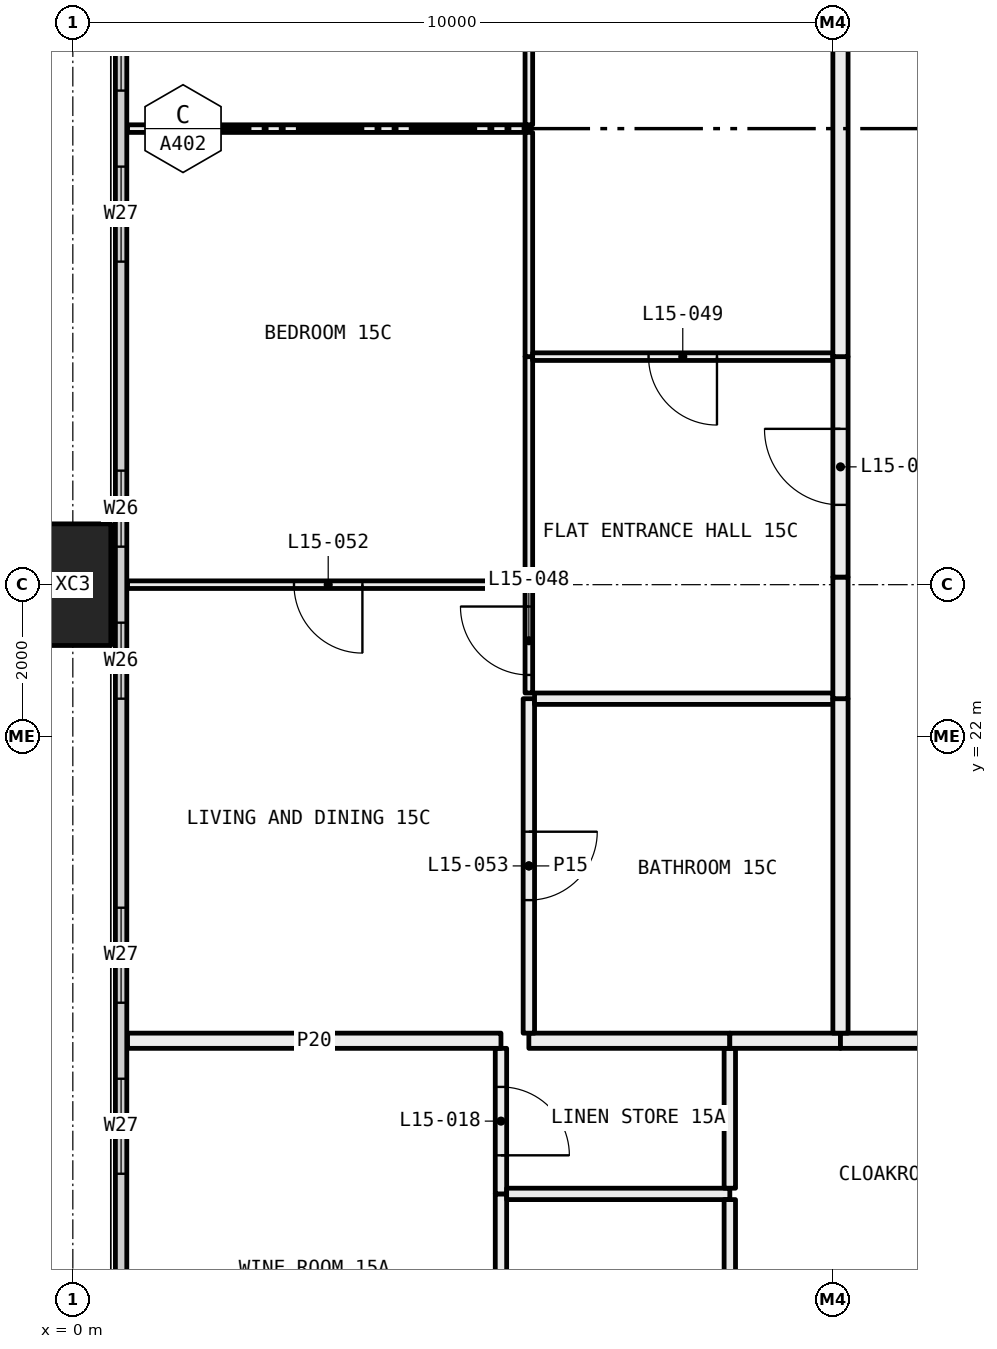
"""IFC4 building model, lengths in metres.
Left out: names, types, materials, properties, quantities, classifications, styles, units other than length and angle.
Written with IfcOpenShell. Run it as: python <this file> out.ifc"""

import sys

from ifc_helpers import new_model, si_unit, direction, frame, frame_2d, origin, origin_2d, place, context, subcontext, project, spatial, rectangle, hollow_rectangle, extrude, element, fill, save


model = new_model("IFC4")
c1 = context("Model", 3, precision=1e-05, world=origin(), true_north=direction((0.0, 1.0)))
c2 = subcontext(c1, "Body", "Model", "MODEL_VIEW")
j1 = project(units=[si_unit("LENGTHUNIT", "METRE"), si_unit("PLANEANGLEUNIT", "RADIAN")], contexts=[c1])
p1 = place(None, origin())
s1 = spatial("IfcSite", under=j1, at=p1, CompositionType="ELEMENT")
p2 = place(p1, origin())
s2 = spatial("IfcBuilding", under=s1, at=p2, CompositionType="ELEMENT")
p3 = place(p2, frame((0.0, 0.0, 64.5)))
s3 = spatial("IfcBuildingStorey", under=s2, at=p3, CompositionType="ELEMENT", Elevation=64.5)
p4 = place(p3, frame((0.0, 24.0, -0.4), z_axis=(0.0, 0.0, 1.0), x_axis=(0.0, 1.0, 0.0)))
e1 = element("IfcColumn", 1, at=p4, inside=s3, PredefinedType="COLUMN", context=c2, shape_type="SweptSolid", body=[
    extrude(hollow_rectangle(XDim=1.6, YDim=1.0, WallThickness=0.065, at=origin_2d()), origin(), (0.0, 0.0, 1.0), 3.45),
])
p5 = place(p3, frame((0.635, 6.71, 0.0), z_axis=(0.0, 0.0, 1.0), x_axis=(0.0, 1.0, 0.0)))
e2 = element("IfcWall", 2, at=p5, inside=s3, PredefinedType="ELEMENTEDWALL", context=c2, shape_type="SweptSolid", body=[
    extrude(rectangle(XDim=34.58, YDim=0.15, at=frame_2d((17.29, 0.0))), origin(), (0.0, 0.0, 1.0), 3.05),
])
p6 = place(p5, frame((0.29, 0.0, 0.45)))
e3 = element("IfcOpeningElement", 3, at=p6, cuts=e2, PredefinedType="OPENING", context=c2, shape_type="SweptSolid", body=[
    extrude(rectangle(XDim=4.5, YDim=2.55, at=frame_2d((2.25, 1.275))), frame((0.0, 0.085, 0.0), z_axis=(0.0, -1.0, 0.0), x_axis=(1.0, 0.0, 0.0)), (0.0, 0.0, 1.0), 0.17),
])
p7 = place(p5, frame((5.79, 0.0, 0.45)))
e4 = element("IfcOpeningElement", 4, at=p7, cuts=e2, PredefinedType="OPENING", context=c2, shape_type="SweptSolid", body=[
    extrude(rectangle(XDim=1.0, YDim=2.55, at=frame_2d((0.5, 1.275))), frame((0.0, 0.085, 0.0), z_axis=(0.0, -1.0, 0.0), x_axis=(1.0, 0.0, 0.0)), (0.0, 0.0, 1.0), 0.17),
])
p8 = place(p5, frame((9.54, 0.0, 0.45)))
e5 = element("IfcOpeningElement", 5, at=p8, cuts=e2, PredefinedType="OPENING", context=c2, shape_type="SweptSolid", body=[
    extrude(rectangle(XDim=1.25, YDim=2.55, at=frame_2d((0.625, 1.275))), frame((0.0, 0.085, 0.0), z_axis=(0.0, -1.0, 0.0), x_axis=(1.0, 0.0, 0.0)), (0.0, 0.0, 1.0), 0.17),
])
p9 = place(p5, frame((11.79, 0.0, 0.45)))
e6 = element("IfcOpeningElement", 6, at=p9, cuts=e2, PredefinedType="OPENING", context=c2, shape_type="SweptSolid", body=[
    extrude(rectangle(XDim=1.25, YDim=2.55, at=frame_2d((0.625, 1.275))), frame((0.0, 0.085, 0.0), z_axis=(0.0, -1.0, 0.0), x_axis=(1.0, 0.0, 0.0)), (0.0, 0.0, 1.0), 0.17),
])
p10 = place(p5, frame((15.79, 0.0, 0.45)))
e7 = element("IfcOpeningElement", 7, at=p10, cuts=e2, PredefinedType="OPENING", context=c2, shape_type="SweptSolid", body=[
    extrude(rectangle(XDim=1.0, YDim=2.55, at=frame_2d((0.5, 1.275))), frame((0.0, 0.085, 0.0), z_axis=(0.0, -1.0, 0.0), x_axis=(1.0, 0.0, 0.0)), (0.0, 0.0, 1.0), 0.17),
])
p11 = place(p5, frame((17.79, 0.0, 0.45)))
e8 = element("IfcOpeningElement", 8, at=p11, cuts=e2, PredefinedType="OPENING", context=c2, shape_type="SweptSolid", body=[
    extrude(rectangle(XDim=1.0, YDim=2.55, at=frame_2d((0.5, 1.275))), frame((0.0, 0.085, 0.0), z_axis=(0.0, -1.0, 0.0), x_axis=(1.0, 0.0, 0.0)), (0.0, 0.0, 1.0), 0.17),
])
p12 = place(p5, frame((21.54, 0.0, 0.45)))
e9 = element("IfcOpeningElement", 9, at=p12, cuts=e2, PredefinedType="OPENING", context=c2, shape_type="SweptSolid", body=[
    extrude(rectangle(XDim=1.25, YDim=2.55, at=frame_2d((0.625, 1.275))), frame((0.0, 0.085, 0.0), z_axis=(0.0, -1.0, 0.0), x_axis=(1.0, 0.0, 0.0)), (0.0, 0.0, 1.0), 0.17),
])
p13 = place(p5, frame((23.79, 0.0, 0.45)))
e10 = element("IfcOpeningElement", 10, at=p13, cuts=e2, PredefinedType="OPENING", context=c2, shape_type="SweptSolid", body=[
    extrude(rectangle(XDim=1.25, YDim=2.55, at=frame_2d((0.625, 1.275))), frame((0.0, 0.085, 0.0), z_axis=(0.0, -1.0, 0.0), x_axis=(1.0, 0.0, 0.0)), (0.0, 0.0, 1.0), 0.17),
])
p14 = place(p5, frame((27.79, 0.0, 0.45)))
e11 = element("IfcOpeningElement", 11, at=p14, cuts=e2, PredefinedType="OPENING", context=c2, shape_type="SweptSolid", body=[
    extrude(rectangle(XDim=1.0, YDim=2.55, at=frame_2d((0.5, 1.275))), frame((0.0, 0.085, 0.0), z_axis=(0.0, -1.0, 0.0), x_axis=(1.0, 0.0, 0.0)), (0.0, 0.0, 1.0), 0.17),
])
p15 = place(p5, frame((29.79, 0.0, 0.45)))
e12 = element("IfcOpeningElement", 12, at=p15, cuts=e2, PredefinedType="OPENING", context=c2, shape_type="SweptSolid", body=[
    extrude(rectangle(XDim=4.5, YDim=2.55, at=frame_2d((2.25, 1.275))), frame((0.0, 0.085, 0.0), z_axis=(0.0, -1.0, 0.0), x_axis=(1.0, 0.0, 0.0)), (0.0, 0.0, 1.0), 0.17),
])
p16 = place(p3, frame((5.633, 12.075, 0.0), z_axis=(0.0, 0.0, 1.0), x_axis=(0.0, 1.0, 0.0)))
e13 = element("IfcWall", 13, at=p16, inside=s3, PredefinedType="PARTITIONING", context=c2, shape_type="SweptSolid", body=[
    extrude(rectangle(XDim=3.91, YDim=0.15, at=frame_2d((1.955, 0.0))), origin(), (0.0, 0.0, 1.0), 2.45),
])
p17 = place(p3, frame((5.633, 15.985, 0.0), z_axis=(0.0, 0.0, 1.0), x_axis=(0.0, 1.0, 0.0)))
e14 = element("IfcWall", 14, at=p17, inside=s3, PredefinedType="PARTITIONING", context=c2, shape_type="SweptSolid", body=[
    extrude(rectangle(XDim=1.915, YDim=0.15, at=frame_2d((0.958, 0.0))), origin(), (0.0, 0.0, 1.0), 3.05),
])
p18 = place(p17, frame((0.508, 0.0, 0.0)))
e15 = element("IfcOpeningElement", 15, at=p18, cuts=e14, PredefinedType="OPENING", context=c2, shape_type="SweptSolid", body=[
    extrude(rectangle(XDim=0.9, YDim=2.1, at=frame_2d((0.45, 1.05))), frame((0.0, 0.085, 0.0), z_axis=(0.0, -1.0, 0.0), x_axis=(1.0, 0.0, 0.0)), (0.0, 0.0, 1.0), 0.17),
])
p19 = place(p3, frame((5.633, 18.0, 0.0), z_axis=(0.0, 0.0, 1.0), x_axis=(-1.0, 0.0, 0.0)))
e16 = element("IfcWall", 16, at=p19, inside=s3, PredefinedType="PARTITIONING", context=c2, shape_type="SweptSolid", body=[
    extrude(rectangle(XDim=4.913, YDim=0.2, at=frame_2d((2.457, 0.0))), origin(), (0.0, 0.0, 1.0), 3.05),
])
p20 = place(p3, frame((8.644, 15.985, 0.0), z_axis=(0.0, 0.0, 1.0), x_axis=(-1.0, 0.0, 0.0)))
e17 = element("IfcWall", 17, at=p20, inside=s3, PredefinedType="PARTITIONING", context=c2, shape_type="SweptSolid", body=[
    extrude(rectangle(XDim=2.936, YDim=0.15, at=frame_2d((1.468, 0.0))), origin(), (0.0, 0.0, 1.0), 3.05),
])
p21 = place(p3, frame((8.644, 14.471, 0.0), z_axis=(0.0, 0.0, 1.0), x_axis=(0.0, 1.0, 0.0)))
e18 = element("IfcWall", 18, at=p21, inside=s3, PredefinedType="PARTITIONING", context=c2, shape_type="SweptSolid", body=[
    extrude(rectangle(XDim=1.439, YDim=0.15, at=frame_2d((0.719, 0.0))), origin(), (0.0, 0.0, 1.0), 3.05),
])
p22 = place(p3, frame((8.644, 16.06, 0.0), z_axis=(0.0, 0.0, 1.0), x_axis=(0.0, 1.0, 0.0)))
e19 = element("IfcWall", 19, at=p22, inside=s3, PredefinedType="PARTITIONING", context=c2, shape_type="SweptSolid", body=[
    extrude(rectangle(XDim=1.84, YDim=0.15, at=frame_2d((0.92, 0.0))), origin(), (0.0, 0.0, 1.0), 3.05),
])
p23 = place(p3, frame((8.644, 18.0, 0.0), z_axis=(0.0, 0.0, 1.0), x_axis=(-1.0, 0.0, 0.0)))
e20 = element("IfcWall", 20, at=p23, inside=s3, PredefinedType="PARTITIONING", context=c2, shape_type="SweptSolid", body=[
    extrude(rectangle(XDim=2.644, YDim=0.2, at=frame_2d((1.322, 0.0))), origin(), (0.0, 0.0, 1.0), 3.05),
])
p24 = place(p3, frame((10.1, 18.0, 0.0), z_axis=(0.0, 0.0, 1.0), x_axis=(-1.0, 0.0, 0.0)))
e21 = element("IfcWall", 21, at=p24, inside=s3, PredefinedType="PARTITIONING", context=c2, shape_type="SweptSolid", body=[
    extrude(rectangle(XDim=1.456, YDim=0.2, at=frame_2d((0.728, 0.0))), origin(), (0.0, 0.0, 1.0), 3.05),
])
p25 = place(p3, frame((13.5, 18.0, 0.0), z_axis=(0.0, 0.0, 1.0), x_axis=(-1.0, 0.0, 0.0)))
e22 = element("IfcWall", 22, at=p25, inside=s3, PredefinedType="PARTITIONING", context=c2, shape_type="SweptSolid", body=[
    extrude(rectangle(XDim=3.4, YDim=0.2, at=frame_2d((1.7, 0.0))), origin(), (0.0, 0.0, 1.0), 3.05),
])
p26 = place(p3, frame((6.0, 24.0, 0.0), z_axis=(0.0, 0.0, 1.0), x_axis=(-1.0, 0.0, 0.0)))
e23 = element("IfcWall", 23, at=p26, inside=s3, PredefinedType="PARTITIONING", context=c2, shape_type="SweptSolid", body=[
    extrude(rectangle(XDim=5.28, YDim=0.1, at=frame_2d((2.64, 0.0))), origin(), (0.0, 0.0, 1.0), 2.45),
])
p27 = place(p26, frame((2.19, 0.0, 0.0)))
e24 = element("IfcOpeningElement", 24, at=p27, cuts=e23, PredefinedType="OPENING", context=c2, shape_type="SweptSolid", body=[
    extrude(rectangle(XDim=0.9, YDim=2.1, at=frame_2d((0.45, 1.05))), frame((0.0, 0.06, 0.0), z_axis=(0.0, -1.0, 0.0), x_axis=(1.0, 0.0, 0.0)), (0.0, 0.0, 1.0), 0.12),
])
p28 = place(p3, frame((6.0, 18.1, 0.0), z_axis=(0.0, 0.0, 1.0), x_axis=(0.0, 1.0, 0.0)))
e25 = element("IfcWall", 25, at=p28, inside=s3, PredefinedType="PARTITIONING", context=c2, shape_type="SweptSolid", body=[
    extrude(rectangle(XDim=4.4, YDim=0.15, at=frame_2d((2.2, 0.0))), origin(), (0.0, 0.0, 1.0), 3.05),
])
p29 = place(p28, frame((1.75, 0.0, 0.0)))
e26 = element("IfcOpeningElement", 26, at=p29, cuts=e25, PredefinedType="OPENING", context=c2, shape_type="SweptSolid", body=[
    extrude(rectangle(XDim=0.9, YDim=2.1, at=frame_2d((0.45, 1.05))), frame((0.0, 0.085, 0.0), z_axis=(0.0, -1.0, 0.0), x_axis=(1.0, 0.0, 0.0)), (0.0, 0.0, 1.0), 0.17),
])
p30 = place(p3, frame((6.0, 22.575, 0.0), z_axis=(0.0, 0.0, 1.0), x_axis=(0.0, 1.0, 0.0)))
e27 = element("IfcWall", 27, at=p30, inside=s3, PredefinedType="PARTITIONING", context=c2, shape_type="SweptSolid", body=[
    extrude(rectangle(XDim=1.375, YDim=0.1, at=frame_2d((0.688, 0.0))), origin(), (0.0, 0.0, 1.0), 2.45),
])
p31 = place(p30, frame((0.238, 0.0, 0.0)))
e28 = element("IfcOpeningElement", 28, at=p31, cuts=e27, PredefinedType="OPENING", context=c2, shape_type="SweptSolid", body=[
    extrude(rectangle(XDim=0.9, YDim=2.1, at=frame_2d((0.45, 1.05))), frame((0.0, 0.06, 0.0), z_axis=(0.0, -1.0, 0.0), x_axis=(1.0, 0.0, 0.0)), (0.0, 0.0, 1.0), 0.12),
])
p32 = place(p3, frame((6.0, 30.0, 0.0), z_axis=(0.0, 0.0, 1.0), x_axis=(-1.0, 0.0, 0.0)))
e29 = element("IfcWall", 29, at=p32, inside=s3, PredefinedType="PARTITIONING", context=c2, shape_type="SweptSolid", body=[
    extrude(rectangle(XDim=5.28, YDim=0.1, at=frame_2d((2.64, 0.0))), origin(), (0.0, 0.0, 1.0), 3.05),
])
p33 = place(p3, frame((6.0, 24.05, 0.0), z_axis=(0.0, 0.0, 1.0), x_axis=(0.0, 1.0, 0.0)))
e30 = element("IfcWall", 30, at=p33, inside=s3, PredefinedType="PARTITIONING", context=c2, shape_type="SweptSolid", body=[
    extrude(rectangle(XDim=2.95, YDim=0.1, at=frame_2d((1.475, 0.0))), origin(), (0.0, 0.0, 1.0), 2.45),
])
p34 = place(p3, frame((6.0, 27.0, 0.0), z_axis=(0.0, 0.0, 1.0), x_axis=(0.0, 1.0, 0.0)))
e31 = element("IfcWall", 31, at=p34, inside=s3, PredefinedType="PARTITIONING", context=c2, shape_type="SweptSolid", body=[
    extrude(rectangle(XDim=2.95, YDim=0.1, at=frame_2d((1.475, 0.0))), origin(), (0.0, 0.0, 1.0), 3.05),
])
p35 = place(p3, frame((6.0, 30.05, 0.0), z_axis=(0.0, 0.0, 1.0), x_axis=(0.0, 1.0, 0.0)))
e32 = element("IfcWall", 32, at=p35, inside=s3, PredefinedType="PARTITIONING", context=c2, shape_type="SweptSolid", body=[
    extrude(rectangle(XDim=5.9, YDim=0.1, at=frame_2d((2.95, 0.0))), origin(), (0.0, 0.0, 1.0), 2.45),
])
p36 = place(p35, frame((2.5, 0.0, 0.0)))
e33 = element("IfcOpeningElement", 33, at=p36, cuts=e32, PredefinedType="OPENING", context=c2, shape_type="SweptSolid", body=[
    extrude(rectangle(XDim=0.9, YDim=2.1, at=frame_2d((0.45, 1.05))), frame((0.0, 0.06, 0.0), z_axis=(0.0, -1.0, 0.0), x_axis=(1.0, 0.0, 0.0)), (0.0, 0.0, 1.0), 0.12),
])
p37 = place(p3, frame((10.0, 22.5, 0.0), z_axis=(0.0, 0.0, 1.0), x_axis=(-1.0, 0.0, 0.0)))
e34 = element("IfcWall", 34, at=p37, inside=s3, PredefinedType="PARTITIONING", context=c2, shape_type="SweptSolid", body=[
    extrude(rectangle(XDim=3.925, YDim=0.15, at=frame_2d((1.962, 0.0))), origin(), (0.0, 0.0, 1.0), 3.05),
])
p38 = place(p3, frame((10.1, 18.1, 0.0), z_axis=(0.0, 0.0, 1.0), x_axis=(0.0, 1.0, 0.0)))
e35 = element("IfcWall", 35, at=p38, inside=s3, PredefinedType="PARTITIONING", context=c2, shape_type="SweptSolid", body=[
    extrude(rectangle(XDim=4.4, YDim=0.2, at=frame_2d((2.2, 0.0))), origin(), (0.0, 0.0, 1.0), 3.05),
])
p39 = place(p3, frame((10.0, 27.0, 0.0), z_axis=(0.0, 0.0, 1.0), x_axis=(-1.0, 0.0, 0.0)))
e36 = element("IfcWall", 36, at=p39, inside=s3, PredefinedType="PARTITIONING", context=c2, shape_type="SweptSolid", body=[
    extrude(rectangle(XDim=3.95, YDim=0.1, at=frame_2d((1.975, 0.0))), origin(), (0.0, 0.0, 1.0), 3.05),
])
p40 = place(p39, frame((1.525, 0.0, 0.0)))
e37 = element("IfcOpeningElement", 37, at=p40, cuts=e36, PredefinedType="OPENING", context=c2, shape_type="SweptSolid", body=[
    extrude(rectangle(XDim=0.9, YDim=2.1, at=frame_2d((0.45, 1.05))), frame((0.0, 0.06, 0.0), z_axis=(0.0, -1.0, 0.0), x_axis=(1.0, 0.0, 0.0)), (0.0, 0.0, 1.0), 0.12),
])
p41 = place(p3, frame((10.1, 22.5, 0.0), z_axis=(0.0, 0.0, 1.0), x_axis=(0.0, 1.0, 0.0)))
e38 = element("IfcWall", 38, at=p41, inside=s3, PredefinedType="PARTITIONING", context=c2, shape_type="SweptSolid", body=[
    extrude(rectangle(XDim=1.6, YDim=0.2, at=frame_2d((0.8, 0.0))), origin(), (0.0, 0.0, 1.0), 2.45),
])
p42 = place(p3, frame((10.1, 24.1, 0.0), z_axis=(0.0, 0.0, 1.0), x_axis=(0.0, 1.0, 0.0)))
e39 = element("IfcWall", 39, at=p42, inside=s3, PredefinedType="PARTITIONING", context=c2, shape_type="SweptSolid", body=[
    extrude(rectangle(XDim=2.9, YDim=0.2, at=frame_2d((1.45, 0.0))), origin(), (0.0, 0.0, 1.0), 3.05),
])
p43 = place(p42, frame((0.95, 0.0, 0.0)))
e40 = element("IfcOpeningElement", 40, at=p43, cuts=e39, PredefinedType="OPENING", context=c2, shape_type="SweptSolid", body=[
    extrude(rectangle(XDim=1.0, YDim=2.1, at=frame_2d((0.5, 1.05))), frame((0.0, 0.11, 0.0), z_axis=(0.0, -1.0, 0.0), x_axis=(1.0, 0.0, 0.0)), (0.0, 0.0, 1.0), 0.22),
])
p44 = place(p3, frame((10.1, 27.0, 0.0), z_axis=(0.0, 0.0, 1.0), x_axis=(0.0, 1.0, 0.0)))
e41 = element("IfcWall", 41, at=p44, inside=s3, PredefinedType="PARTITIONING", context=c2, shape_type="SweptSolid", body=[
    extrude(rectangle(XDim=9.1, YDim=0.2, at=frame_2d((4.55, 0.0))), origin(), (0.0, 0.0, 1.0), 2.45),
])
p45 = place(p8, origin())
e42 = element("IfcWindow", 42, at=p45, inside=s3, PartitioningType="SINGLE_PANEL", PredefinedType="WINDOW", context=c2, shape_type="SweptSolid", body=[
    extrude(rectangle(XDim=1.25, YDim=2.55, at=frame_2d((0.625, 1.275))), frame((0.0, 0.03, 0.0), z_axis=(0.0, -1.0, 0.0), x_axis=(1.0, 0.0, 0.0)), (0.0, 0.0, 1.0), 0.06),
])
fill(e5, e42)
p46 = place(p9, origin())
e43 = element("IfcWindow", 43, at=p46, inside=s3, PartitioningType="SINGLE_PANEL", PredefinedType="WINDOW", context=c2, shape_type="SweptSolid", body=[
    extrude(rectangle(XDim=1.25, YDim=2.55, at=frame_2d((0.625, 1.275))), frame((0.0, 0.03, 0.0), z_axis=(0.0, -1.0, 0.0), x_axis=(1.0, 0.0, 0.0)), (0.0, 0.0, 1.0), 0.06),
])
fill(e6, e43)
p47 = place(p10, origin())
e44 = element("IfcWindow", 44, at=p47, inside=s3, PartitioningType="SINGLE_PANEL", PredefinedType="WINDOW", context=c2, shape_type="SweptSolid", body=[
    extrude(rectangle(XDim=1.0, YDim=2.55, at=frame_2d((0.5, 1.275))), frame((0.0, 0.03, 0.0), z_axis=(0.0, -1.0, 0.0), x_axis=(1.0, 0.0, 0.0)), (0.0, 0.0, 1.0), 0.06),
])
fill(e7, e44)
p48 = place(p11, origin())
e45 = element("IfcWindow", 45, at=p48, inside=s3, PartitioningType="SINGLE_PANEL", PredefinedType="WINDOW", context=c2, shape_type="SweptSolid", body=[
    extrude(rectangle(XDim=1.0, YDim=2.55, at=frame_2d((0.5, 1.275))), frame((0.0, 0.03, 0.0), z_axis=(0.0, -1.0, 0.0), x_axis=(1.0, 0.0, 0.0)), (0.0, 0.0, 1.0), 0.06),
])
fill(e8, e45)
p49 = place(p12, origin())
e46 = element("IfcWindow", 46, at=p49, inside=s3, PartitioningType="SINGLE_PANEL", PredefinedType="WINDOW", context=c2, shape_type="SweptSolid", body=[
    extrude(rectangle(XDim=1.25, YDim=2.55, at=frame_2d((0.625, 1.275))), frame((0.0, 0.03, 0.0), z_axis=(0.0, -1.0, 0.0), x_axis=(1.0, 0.0, 0.0)), (0.0, 0.0, 1.0), 0.06),
])
fill(e9, e46)
p50 = place(p13, origin())
e47 = element("IfcWindow", 47, at=p50, inside=s3, PartitioningType="SINGLE_PANEL", PredefinedType="WINDOW", context=c2, shape_type="SweptSolid", body=[
    extrude(rectangle(XDim=1.25, YDim=2.55, at=frame_2d((0.625, 1.275))), frame((0.0, 0.03, 0.0), z_axis=(0.0, -1.0, 0.0), x_axis=(1.0, 0.0, 0.0)), (0.0, 0.0, 1.0), 0.06),
])
fill(e10, e47)
p51 = place(p18, frame((0.9, 0.0, 0.0), x_axis=(-1.0, 0.0, 0.0)))
e48 = element("IfcDoor", 48, at=p51, inside=s3, OperationType="SINGLE_SWING_LEFT", PredefinedType="DOOR", context=c2, shape_type="SweptSolid", body=[
    extrude(rectangle(XDim=0.9, YDim=2.1, at=frame_2d((0.45, 1.05))), frame((0.0, 0.025, 0.0), z_axis=(0.0, -1.0, 0.0), x_axis=(1.0, 0.0, 0.0)), (0.0, 0.0, 1.0), 0.05),
])
fill(e15, e48)
p52 = place(p43, origin())
e49 = element("IfcDoor", 49, at=p52, inside=s3, OperationType="SINGLE_SWING_LEFT", PredefinedType="DOOR", context=c2, shape_type="SweptSolid", body=[
    extrude(rectangle(XDim=1.0, YDim=2.1, at=frame_2d((0.5, 1.05))), frame((0.0, 0.025, 0.0), z_axis=(0.0, -1.0, 0.0), x_axis=(1.0, 0.0, 0.0)), (0.0, 0.0, 1.0), 0.05),
])
fill(e40, e49)
p53 = place(p31, origin())
e50 = element("IfcDoor", 50, at=p53, inside=s3, OperationType="SINGLE_SWING_LEFT", PredefinedType="DOOR", context=c2, shape_type="SweptSolid", body=[
    extrude(rectangle(XDim=0.9, YDim=2.1, at=frame_2d((0.45, 1.05))), frame((0.0, 0.025, 0.0), z_axis=(0.0, -1.0, 0.0), x_axis=(1.0, 0.0, 0.0)), (0.0, 0.0, 1.0), 0.05),
])
fill(e28, e50)
p54 = place(p40, origin())
e51 = element("IfcDoor", 51, at=p54, inside=s3, OperationType="SINGLE_SWING_RIGHT", PredefinedType="DOOR", context=c2, shape_type="SweptSolid", body=[
    extrude(rectangle(XDim=0.9, YDim=2.1, at=frame_2d((0.45, 1.05))), frame((0.0, 0.025, 0.0), z_axis=(0.0, -1.0, 0.0), x_axis=(1.0, 0.0, 0.0)), (0.0, 0.0, 1.0), 0.05),
])
fill(e37, e51)
p55 = place(p27, origin())
e52 = element("IfcDoor", 52, at=p55, inside=s3, OperationType="SINGLE_SWING_RIGHT", PredefinedType="DOOR", context=c2, shape_type="SweptSolid", body=[
    extrude(rectangle(XDim=0.9, YDim=2.1, at=frame_2d((0.45, 1.05))), frame((0.0, 0.025, 0.0), z_axis=(0.0, -1.0, 0.0), x_axis=(1.0, 0.0, 0.0)), (0.0, 0.0, 1.0), 0.05),
])
fill(e24, e52)
p56 = place(p29, frame((0.9, 0.0, 0.0), x_axis=(-1.0, 0.0, 0.0)))
e53 = element("IfcDoor", 53, at=p56, inside=s3, OperationType="SINGLE_SWING_RIGHT", PredefinedType="DOOR", context=c2, shape_type="SweptSolid", body=[
    extrude(rectangle(XDim=0.9, YDim=2.1, at=frame_2d((0.45, 1.05))), frame((0.0, 0.025, 0.0), z_axis=(0.0, -1.0, 0.0), x_axis=(1.0, 0.0, 0.0)), (0.0, 0.0, 1.0), 0.05),
])
fill(e26, e53)
save(model, sys.argv[1])
